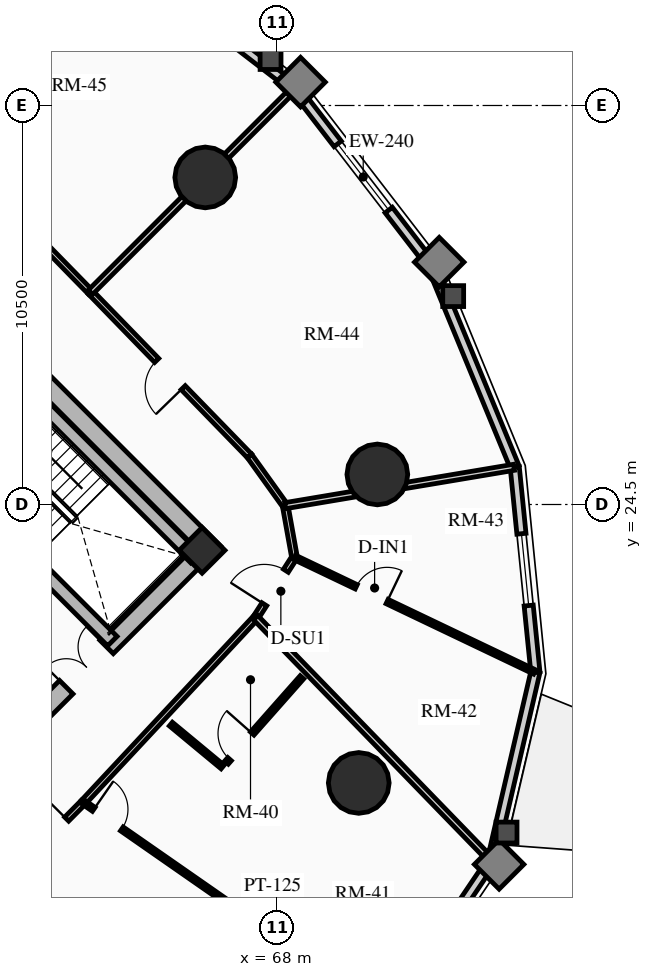
"""IFC4 building model, lengths in metres.
Left out: names, types, materials, properties, quantities, classifications, styles, units other than length and angle.
Written with IfcOpenShell. Run it as: python <this file> out.ifc"""

import sys

from ifc_helpers import new_model, si_unit, direction, frame, frame_2d, origin, origin_2d, place, context, subcontext, project, spatial, rectangle, circle, extrude, source, transform, mapped, element, fill, save


model = new_model("IFC4")
c1 = context("Model", 3, precision=1e-05, world=origin(), true_north=direction((0.0, 1.0)))
c2 = subcontext(c1, "Body", "Model", "MODEL_VIEW")
j1 = project(units=[si_unit("LENGTHUNIT", "METRE"), si_unit("PLANEANGLEUNIT", "RADIAN")], contexts=[c1])
p1 = place(None, origin())
s1 = spatial("IfcSite", under=j1, at=p1, CompositionType="ELEMENT")
p2 = place(p1, origin())
s2 = spatial("IfcBuilding", under=s1, at=p2, CompositionType="ELEMENT")
p3 = place(p2, frame((0.0, 0.0, 39.46)))
s3 = spatial("IfcBuildingStorey", under=s2, at=p3, CompositionType="ELEMENT", Elevation=39.46)
p4 = place(p3, frame((66.339, 23.227, 0.0), z_axis=(0.0, 0.0, 1.0), x_axis=(-0.707106781187, 0.707106781187, 0.0)))
e1 = element("IfcWall", 1, at=p4, inside=s3, PredefinedType="SHEAR", context=c2, shape_type="SweptSolid", body=[
    extrude(rectangle(XDim=14.3, YDim=0.5, at=frame_2d((7.15, 0.0))), origin(), (0.0, 0.0, 1.0), 2.91),
])
p5 = place(p3, frame((58.596, 15.838, 0.0), z_axis=(0.0, 0.0, 1.0), x_axis=(0.707106781187, 0.707106781187, 0.0)))
e2 = element("IfcWall", 2, at=p5, inside=s3, PredefinedType="SHEAR", context=c2, shape_type="SweptSolid", body=[
    extrude(rectangle(XDim=10.7, YDim=0.5, at=frame_2d((5.35, 0.0))), origin(), (0.0, 0.0, 1.0), 2.91),
])
m1 = source(origin(), c2, "Body", "SweptSolid", [
    extrude(rectangle(XDim=1.5, YDim=2.02, at=frame_2d((0.75, 1.01))), frame((0.0, 0.26, 0.0), z_axis=(0.0, -1.0, 0.0), x_axis=(1.0, 0.0, 0.0)), (0.0, 0.0, 1.0), 0.52),
])
p6 = place(p5, frame((5.45, 0.0, 0.0)))
e3 = element("IfcOpeningElement", 3, at=p6, cuts=e2, PredefinedType="OPENING", context=c2, shape_type="MappedRepresentation", body=[
    mapped(m1, transform((0.0, 0.0, 0.0), x_axis=(1.0, 0.0, 0.0), y_axis=(0.0, 1.0, 0.0), z_axis=(0.0, 0.0, 1.0), scale=1.0)),
])
p7 = place(p3, frame((63.662, 20.904, 0.0), z_axis=(0.0, 0.0, 1.0), x_axis=(-0.707106781187, 0.707106781187, 0.0)))
e4 = element("IfcWall", 4, at=p7, inside=s3, PredefinedType="SHEAR", context=c2, shape_type="SweptSolid", body=[
    extrude(rectangle(XDim=13.8, YDim=0.35, at=frame_2d((6.9, 0.0))), origin(), (0.0, 0.0, 1.0), 2.91),
])
m2 = source(origin(), c2, "Body", "SweptSolid", [
    extrude(rectangle(XDim=1.1, YDim=2.015, at=frame_2d((0.55, 1.007))), frame((0.0, 0.185, 0.0), z_axis=(0.0, -1.0, 0.0), x_axis=(1.0, 0.0, 0.0)), (0.0, 0.0, 1.0), 0.37),
])
p8 = place(p7, frame((10.025, 0.0, 0.0)))
e5 = element("IfcOpeningElement", 5, at=p8, cuts=e4, PredefinedType="OPENING", context=c2, shape_type="MappedRepresentation", body=[
    mapped(m2, transform((0.0, 0.0, 0.0), x_axis=(1.0, 0.0, 0.0), y_axis=(0.0, 1.0, 0.0), z_axis=(0.0, 0.0, 1.0), scale=1.0)),
])
p9 = place(p7, frame((12.025, 0.0, 0.0)))
e6 = element("IfcOpeningElement", 6, at=p9, cuts=e4, PredefinedType="OPENING", context=c2, shape_type="MappedRepresentation", body=[
    mapped(m2, transform((0.0, 0.0, 0.0), x_axis=(1.0, 0.0, 0.0), y_axis=(0.0, 1.0, 0.0), z_axis=(0.0, 0.0, 1.0), scale=1.0)),
])
m3 = source(origin(), c2, "Body", "SweptSolid", [
    extrude(rectangle(XDim=1.15, YDim=2.02, at=frame_2d((0.575, 1.01))), frame((0.0, 0.185, 0.0), z_axis=(0.0, -1.0, 0.0), x_axis=(1.0, 0.0, 0.0)), (0.0, 0.0, 1.0), 0.37),
])
p10 = place(p7, frame((5.33, 0.0, 0.0)))
e7 = element("IfcOpeningElement", 7, at=p10, cuts=e4, PredefinedType="OPENING", context=c2, shape_type="MappedRepresentation", body=[
    mapped(m3, transform((0.0, 0.0, 0.0), x_axis=(1.0, 0.0, 0.0), y_axis=(0.0, 1.0, 0.0), z_axis=(0.0, 0.0, 1.0), scale=1.0)),
])
p11 = place(p3, frame((65.847, 23.089, 0.0), z_axis=(0.0, 0.0, 1.0), x_axis=(-0.707106781187, 0.707106781187, 0.0)))
e8 = element("IfcWall", 8, at=p11, inside=s3, PredefinedType="SHEAR", context=c2, shape_type="SweptSolid", body=[
    extrude(rectangle(XDim=6.745, YDim=0.35, at=frame_2d((3.373, 0.0))), origin(), (0.0, 0.0, 1.0), 2.91),
])
p12 = place(p3, frame((66.024, 23.294, 0.0), z_axis=(0.0, 0.0, 1.0), x_axis=(0.707106781187, 0.707106781187, 0.0)))
e9 = element("IfcColumn", 9, at=p12, inside=s3, PredefinedType="COLUMN", context=c2, shape_type="SweptSolid", body=[
    extrude(rectangle(XDim=0.85, YDim=0.85, at=origin_2d()), origin(), (0.0, 0.0, 1.0), 2.91),
])
for number, where, z_axis, x_axis in (
    (10, (66.107, 33.107, 0.0), (0.0, 0.0, 1.0), (1.0, 0.0, 0.0)),
    (11, (70.146, 17.173, 0.0), (0.0, 0.0, 1.0), (1.0, 0.0, 0.0)),
    (12, (70.635, 25.291, 0.0), (0.0, 0.0, 1.0), (1.0, 0.0, 0.0)),
):
    element("IfcColumn", number, at=place(p3, frame(where, z_axis=z_axis, x_axis=x_axis)), inside=s3, PredefinedType="USERDEFINED", context=c2, shape_type="SweptSolid", body=[
        extrude(circle(Radius=0.8, at=origin_2d()), origin(), (0.0, 0.0, 1.0), 2.91),
    ])
p13 = place(p3, frame((63.778, 39.068, 0.0), z_axis=(0.0, 0.0, 1.0), x_axis=(0.792020182601, -0.610494906082, 0.0)))
e13 = element("IfcWall", 13, at=p13, inside=s3, PredefinedType="SOLIDWALL", context=c2, shape_type="SweptSolid", body=[
    extrude(rectangle(XDim=5.911, YDim=0.24, at=frame_2d((2.956, 0.0))), origin(), (0.0, 0.0, 1.0), 2.073),
])
p14 = place(p3, frame((73.644, 15.129, 0.0), z_axis=(0.0, 0.0, 1.0), x_axis=(-0.559621532896, -0.828748297084, 0.0)))
e14 = element("IfcWall", 14, at=p14, inside=s3, PredefinedType="SOLIDWALL", context=c2, shape_type="SweptSolid", body=[
    extrude(rectangle(XDim=4.879, YDim=0.24, at=frame_2d((2.439, 0.0))), origin(), (0.0, 0.0, 1.0), 2.073),
])
m4 = source(origin(), c2, "Body", "SweptSolid", [
    extrude(rectangle(XDim=1.9, YDim=1.35, at=frame_2d((0.95, 0.675))), frame((0.0, 0.13, 0.0), z_axis=(0.0, -1.0, 0.0), x_axis=(1.0, 0.0, 0.0)), (0.0, 0.0, 1.0), 0.26),
])
p15 = place(p14, frame((1.489, 0.0, 0.65)))
e15 = element("IfcOpeningElement", 15, at=p15, cuts=e14, PredefinedType="OPENING", context=c2, shape_type="MappedRepresentation", body=[
    mapped(m4, transform((0.0, 0.0, 0.0), x_axis=(1.0, 0.0, 0.0), y_axis=(0.0, 1.0, 0.0), z_axis=(0.0, 0.0, 1.0), scale=1.0)),
])
p16 = place(p3, frame((74.794, 20.09, 0.0), z_axis=(0.0, 0.0, 1.0), x_axis=(-0.22582585901, -0.974167686491, 0.0)))
e16 = element("IfcWall", 16, at=p16, inside=s3, PredefinedType="SOLIDWALL", context=c2, shape_type="SweptSolid", body=[
    extrude(rectangle(XDim=5.092, YDim=0.24, at=frame_2d((2.546, 0.0))), origin(), (0.0, 0.0, 1.0), 2.073),
])
p17 = place(p3, frame((74.251, 25.482, 0.0), z_axis=(0.0, 0.0, 1.0), x_axis=(0.100190592135, -0.994968263437, 0.0)))
e17 = element("IfcWall", 17, at=p17, inside=s3, PredefinedType="SOLIDWALL", context=c2, shape_type="SweptSolid", body=[
    extrude(rectangle(XDim=5.419, YDim=0.24, at=frame_2d((2.71, 0.0))), origin(), (0.0, 0.0, 1.0), 2.073),
])
p18 = place(p17, frame((1.76, 0.0, 0.65)))
e18 = element("IfcOpeningElement", 18, at=p18, cuts=e17, PredefinedType="OPENING", context=c2, shape_type="MappedRepresentation", body=[
    mapped(m4, transform((0.0, 0.0, 0.0), x_axis=(1.0, 0.0, 0.0), y_axis=(0.0, 1.0, 0.0), z_axis=(0.0, 0.0, 1.0), scale=1.0)),
])
p19 = place(p3, frame((72.068, 30.778, 0.0), z_axis=(0.0, 0.0, 1.0), x_axis=(0.381077764176, -0.924542988536, 0.0)))
e19 = element("IfcWall", 19, at=p19, inside=s3, PredefinedType="SOLIDWALL", context=c2, shape_type="SweptSolid", body=[
    extrude(rectangle(XDim=5.728, YDim=0.24, at=frame_2d((2.864, 0.0))), origin(), (0.0, 0.0, 1.0), 2.073),
])
p20 = place(p3, frame((68.459, 35.459, 0.0), z_axis=(0.0, 0.0, 1.0), x_axis=(0.610494906082, -0.792020182601, 0.0)))
e20 = element("IfcWall", 20, at=p20, inside=s3, PredefinedType="SOLIDWALL", context=c2, shape_type="SweptSolid", body=[
    extrude(rectangle(XDim=5.911, YDim=0.24, at=frame_2d((2.956, 0.0))), origin(), (0.0, 0.0, 1.0), 2.073),
])
m5 = source(origin(), c2, "Body", "SweptSolid", [
    extrude(rectangle(XDim=2.2, YDim=1.35, at=frame_2d((1.1, 0.675))), frame((0.0, 0.13, 0.0), z_axis=(0.0, -1.0, 0.0), x_axis=(1.0, 0.0, 0.0)), (0.0, 0.0, 1.0), 0.26),
])
p21 = place(p20, frame((1.855, 0.0, 0.65)))
e21 = element("IfcOpeningElement", 21, at=p21, cuts=e20, PredefinedType="OPENING", context=c2, shape_type="MappedRepresentation", body=[
    mapped(m5, transform((0.0, 0.0, 0.0), x_axis=(1.0, 0.0, 0.0), y_axis=(0.0, 1.0, 0.0), z_axis=(0.0, 0.0, 1.0), scale=1.0)),
])
p22 = place(p3, frame((63.086, 30.086, 0.0), z_axis=(0.0, 0.0, 1.0), x_axis=(-0.699075897379, 0.715047473741, 0.0)))
e22 = element("IfcWall", 22, at=p22, inside=s3, PredefinedType="PARTITIONING", context=c2, shape_type="SweptSolid", body=[
    extrude(rectangle(XDim=6.114, YDim=0.15, at=frame_2d((3.057, 0.0))), origin(), (0.0, 0.0, 1.0), 2.159),
])
p23 = place(p3, frame((60.562, 14.31, 0.0), z_axis=(0.0, 0.0, 1.0), x_axis=(0.704566236161, 0.709638230975, 0.0)))
e23 = element("IfcWall", 23, at=p23, inside=s3, PredefinedType="PARTITIONING", context=c2, shape_type="SweptSolid", body=[
    extrude(rectangle(XDim=3.321, YDim=0.15, at=frame_2d((1.661, 0.0))), origin(), (0.0, 0.0, 1.0), 2.159),
])
m6 = source(origin(), c2, "Body", "SweptSolid", [
    extrude(rectangle(XDim=1.05, YDim=2.015, at=frame_2d((0.525, 1.007))), frame((0.0, 0.085, 0.0), z_axis=(0.0, -1.0, 0.0), x_axis=(1.0, 0.0, 0.0)), (0.0, 0.0, 1.0), 0.17),
])
p24 = place(p23, frame((1.643, 0.0, 0.0)))
e24 = element("IfcOpeningElement", 24, at=p24, cuts=e23, PredefinedType="OPENING", context=c2, shape_type="MappedRepresentation", body=[
    mapped(m6, transform((0.0, 0.0, 0.0), x_axis=(1.0, 0.0, 0.0), y_axis=(0.0, 1.0, 0.0), z_axis=(0.0, 0.0, 1.0), scale=1.0)),
])
p25 = place(p3, frame((62.903, 16.667, 0.0), z_axis=(0.0, 0.0, 1.0), x_axis=(0.682371947497, 0.731005147225, 0.0)))
e25 = element("IfcWall", 25, at=p25, inside=s3, PredefinedType="PARTITIONING", context=c2, shape_type="SweptSolid", body=[
    extrude(rectangle(XDim=6.642, YDim=0.15, at=frame_2d((3.321, 0.0))), origin(), (0.0, 0.0, 1.0), 2.159),
])
p26 = place(p3, frame((67.435, 21.521, 0.0), z_axis=(0.0, 0.0, 1.0), x_axis=(0.540777197838, 0.841165870859, 0.0)))
e26 = element("IfcWall", 26, at=p26, inside=s3, PredefinedType="PARTITIONING", context=c2, shape_type="SweptSolid", body=[
    extrude(rectangle(XDim=1.888, YDim=0.15, at=frame_2d((0.944, 0.0))), origin(), (0.0, 0.0, 1.0), 2.205),
])
p27 = place(p26, frame((0.419, 0.0, 0.0)))
e27 = element("IfcOpeningElement", 27, at=p27, cuts=e26, PredefinedType="OPENING", context=c2, shape_type="MappedRepresentation", body=[
    mapped(m6, transform((0.0, 0.0, 0.0), x_axis=(1.0, 0.0, 0.0), y_axis=(0.0, 1.0, 0.0), z_axis=(0.0, 0.0, 1.0), scale=1.0)),
])
p28 = place(p3, frame((68.456, 23.11, 0.0), z_axis=(0.0, 0.0, 1.0), x_axis=(-0.1772522795, 0.984165448191, 0.0)))
e28 = element("IfcWall", 28, at=p28, inside=s3, PredefinedType="PARTITIONING", context=c2, shape_type="SweptSolid", body=[
    extrude(rectangle(XDim=1.382, YDim=0.15, at=frame_2d((0.691, 0.0))), origin(), (0.0, 0.0, 1.0), 2.159),
])
p29 = place(p3, frame((68.211, 24.469, 0.0), z_axis=(0.0, 0.0, 1.0), x_axis=(-0.583012141368, 0.812463441034, 0.0)))
e29 = element("IfcWall", 29, at=p29, inside=s3, PredefinedType="PARTITIONING", context=c2, shape_type="SweptSolid", body=[
    extrude(rectangle(XDim=1.613, YDim=0.15, at=frame_2d((0.807, 0.0))), origin(), (0.0, 0.0, 1.0), 2.205),
])
p30 = place(p3, frame((67.27, 25.78, 0.0), z_axis=(0.0, 0.0, 1.0), x_axis=(-0.696847842907, 0.717218992942, 0.0)))
e30 = element("IfcWall", 30, at=p30, inside=s3, PredefinedType="PARTITIONING", context=c2, shape_type="SweptSolid", body=[
    extrude(rectangle(XDim=6.004, YDim=0.15, at=frame_2d((3.002, 0.0))), origin(), (0.0, 0.0, 1.0), 2.635),
])
m7 = source(origin(), c2, "Body", "SweptSolid", [
    extrude(rectangle(XDim=1.0, YDim=2.015, at=frame_2d((0.5, 1.007))), frame((0.0, 0.085, 0.0), z_axis=(0.0, -1.0, 0.0), x_axis=(1.0, 0.0, 0.0)), (0.0, 0.0, 1.0), 0.17),
])
p31 = place(p30, frame((2.502, 0.0, 0.0)))
e31 = element("IfcOpeningElement", 31, at=p31, cuts=e30, PredefinedType="OPENING", context=c2, shape_type="MappedRepresentation", body=[
    mapped(m7, transform((0.0, 0.0, 0.0), x_axis=(1.0, 0.0, 0.0), y_axis=(0.0, 1.0, 0.0), z_axis=(0.0, 0.0, 1.0), scale=1.0)),
])
p32 = place(p3, frame((63.086, 30.086, 0.0), z_axis=(0.0, 0.0, 1.0), x_axis=(0.707106781187, 0.707106781187, 0.0)))
e32 = element("IfcWall", 32, at=p32, inside=s3, PredefinedType="PARTITIONING", context=c2, shape_type="SweptSolid", body=[
    extrude(rectangle(XDim=7.579, YDim=0.16, at=frame_2d((3.79, 0.0))), origin(), (0.0, 0.0, 1.0), 2.073),
])
p33 = place(p3, frame((60.562, 14.31, 0.0), z_axis=(0.0, 0.0, 1.0), x_axis=(0.727781661561, -0.685808904211, 0.0)))
e33 = element("IfcWall", 33, at=p33, inside=s3, PredefinedType="PARTITIONING", context=c2, shape_type="SweptSolid", body=[
    extrude(rectangle(XDim=8.655, YDim=0.16, at=frame_2d((4.328, 0.0))), origin(), (0.0, 0.0, 1.0), 2.073),
])
p34 = place(p3, frame((67.435, 21.521, 0.0), z_axis=(0.0, 0.0, 1.0), x_axis=(0.6962628802, -0.717786877601, 0.0)))
e34 = element("IfcWall", 34, at=p34, inside=s3, PredefinedType="PARTITIONING", context=c2, shape_type="SweptSolid", body=[
    extrude(rectangle(XDim=8.893, YDim=0.16, at=frame_2d((4.446, 0.0))), origin(), (0.0, 0.0, 1.0), 2.073),
])
p35 = place(p3, frame((68.211, 24.469, 0.0), z_axis=(0.0, 0.0, 1.0), x_axis=(0.986231309699, 0.165371713934, 0.0)))
e35 = element("IfcWall", 35, at=p35, inside=s3, PredefinedType="PARTITIONING", context=c2, shape_type="SweptSolid", body=[
    extrude(rectangle(XDim=6.104, YDim=0.16, at=frame_2d((3.052, 0.0))), origin(), (0.0, 0.0, 1.0), 2.073),
])
p36 = place(p3, frame((62.903, 16.667, 0.0), z_axis=(0.0, 0.0, 1.0), x_axis=(0.820761665638, -0.571270766116, 0.0)))
e36 = element("IfcWall", 36, at=p36, inside=s3, PredefinedType="PARTITIONING", context=c2, shape_type="SweptSolid", body=[
    extrude(rectangle(XDim=9.743, YDim=0.125, at=frame_2d((4.872, 0.0))), origin(), (0.0, 0.0, 1.0), 2.073),
])
m8 = source(origin(), c2, "Body", "SweptSolid", [
    extrude(rectangle(XDim=0.9, YDim=2.005, at=frame_2d((0.45, 1.002))), frame((0.0, 0.073, 0.0), z_axis=(0.0, -1.0, 0.0), x_axis=(1.0, 0.0, 0.0)), (0.0, 0.0, 1.0), 0.145),
])
p37 = place(p36, frame((0.33, 0.0, 0.0)))
e37 = element("IfcOpeningElement", 37, at=p37, cuts=e36, PredefinedType="OPENING", context=c2, shape_type="MappedRepresentation", body=[
    mapped(m8, transform((0.0, 0.0, 0.0), x_axis=(1.0, 0.0, 0.0), y_axis=(0.0, 1.0, 0.0), z_axis=(0.0, 0.0, 1.0), scale=1.0)),
])
p38 = place(p3, frame((65.202, 18.721, 0.0), z_axis=(0.0, 0.0, 1.0), x_axis=(0.769814202386, -0.638268042287, 0.0)))
e38 = element("IfcWall", 38, at=p38, inside=s3, PredefinedType="PARTITIONING", context=c2, shape_type="SweptSolid", body=[
    extrude(rectangle(XDim=1.769, YDim=0.125, at=frame_2d((0.884, 0.0))), origin(), (0.0, 0.0, 1.0), 2.635),
])
p39 = place(p3, frame((66.667, 17.709, 0.0), z_axis=(0.0, 0.0, 1.0), x_axis=(0.662510581678, 0.749052554341, 0.0)))
e39 = element("IfcWall", 39, at=p39, inside=s3, PredefinedType="PARTITIONING", context=c2, shape_type="SweptSolid", body=[
    extrude(rectangle(XDim=2.996, YDim=0.125, at=frame_2d((1.498, 0.0))), origin(), (0.0, 0.0, 1.0), 2.159),
])
p40 = place(p39, frame((0.12, 0.0, 0.0)))
e40 = element("IfcOpeningElement", 40, at=p40, cuts=e39, PredefinedType="OPENING", context=c2, shape_type="MappedRepresentation", body=[
    mapped(m8, transform((0.0, 0.0, 0.0), x_axis=(1.0, 0.0, 0.0), y_axis=(0.0, 1.0, 0.0), z_axis=(0.0, 0.0, 1.0), scale=1.0)),
])
p41 = place(p3, frame((68.456, 23.11, 0.0), z_axis=(0.0, 0.0, 1.0), x_axis=(0.902430819297, -0.430834790125, 0.0)))
e41 = element("IfcWall", 41, at=p41, inside=s3, PredefinedType="PARTITIONING", context=c2, shape_type="SweptSolid", body=[
    extrude(rectangle(XDim=7.002, YDim=0.125, at=frame_2d((3.501, 0.0))), origin(), (0.0, 0.0, 1.0), 2.073),
])
p42 = place(p41, frame((1.8, 0.0, 0.0)))
e42 = element("IfcOpeningElement", 42, at=p42, cuts=e41, PredefinedType="OPENING", context=c2, shape_type="MappedRepresentation", body=[
    mapped(m8, transform((0.0, 0.0, 0.0), x_axis=(1.0, 0.0, 0.0), y_axis=(0.0, 1.0, 0.0), z_axis=(0.0, 0.0, 1.0), scale=1.0)),
])
m9 = source(origin(), c2, "Body", "SweptSolid", [
    extrude(rectangle(XDim=1.9, YDim=1.35, at=frame_2d((0.95, 0.675))), frame((0.0, 0.03, 0.0), z_axis=(0.0, -1.0, 0.0), x_axis=(1.0, 0.0, 0.0)), (0.0, 0.0, 1.0), 0.06),
])
p43 = place(p18, origin())
e43 = element("IfcWindow", 43, at=p43, inside=s3, PartitioningType="DOUBLE_PANEL_VERTICAL", PredefinedType="WINDOW", context=c2, shape_type="MappedRepresentation", body=[
    mapped(m9, transform((0.0, 0.0, 0.0), x_axis=(1.0, 0.0, 0.0), y_axis=(0.0, 1.0, 0.0), z_axis=(0.0, 0.0, 1.0), scale=1.0)),
])
fill(e18, e43)
m10 = source(origin(), c2, "Body", "SweptSolid", [
    extrude(rectangle(XDim=2.2, YDim=1.35, at=frame_2d((1.1, 0.675))), frame((0.0, 0.03, 0.0), z_axis=(0.0, -1.0, 0.0), x_axis=(1.0, 0.0, 0.0)), (0.0, 0.0, 1.0), 0.06),
])
p44 = place(p21, origin())
e44 = element("IfcWindow", 44, at=p44, inside=s3, PartitioningType="DOUBLE_PANEL_VERTICAL", PredefinedType="WINDOW", context=c2, shape_type="MappedRepresentation", body=[
    mapped(m10, transform((0.0, 0.0, 0.0), x_axis=(1.0, 0.0, 0.0), y_axis=(0.0, 1.0, 0.0), z_axis=(0.0, 0.0, 1.0), scale=1.0)),
])
fill(e21, e44)
m11 = source(origin(), c2, "Body", "SweptSolid", [
    extrude(rectangle(XDim=1.5, YDim=2.02, at=frame_2d((0.75, 1.01))), frame((0.0, 0.025, 0.0), z_axis=(0.0, -1.0, 0.0), x_axis=(1.0, 0.0, 0.0)), (0.0, 0.0, 1.0), 0.05),
])
p45 = place(p6, origin())
e45 = element("IfcDoor", 45, at=p45, inside=s3, OperationType="DOUBLE_DOOR_SINGLE_SWING", PredefinedType="DOOR", context=c2, shape_type="MappedRepresentation", body=[
    mapped(m11, transform((0.0, 0.0, 0.0), x_axis=(1.0, 0.0, 0.0), y_axis=(0.0, 1.0, 0.0), z_axis=(0.0, 0.0, 1.0), scale=1.0)),
])
fill(e3, e45)
m12 = source(origin(), c2, "Body", "SweptSolid", [
    extrude(rectangle(XDim=1.05, YDim=2.015, at=frame_2d((0.525, 1.007))), frame((0.0, 0.025, 0.0), z_axis=(0.0, -1.0, 0.0), x_axis=(1.0, 0.0, 0.0)), (0.0, 0.0, 1.0), 0.05),
])
p46 = place(p24, origin())
e46 = element("IfcDoor", 46, at=p46, inside=s3, OperationType="SINGLE_SWING_RIGHT", PredefinedType="DOOR", context=c2, shape_type="MappedRepresentation", body=[
    mapped(m12, transform((0.0, 0.0, 0.0), x_axis=(1.0, 0.0, 0.0), y_axis=(0.0, 1.0, 0.0), z_axis=(0.0, 0.0, 1.0), scale=1.0)),
])
fill(e24, e46)
m13 = source(origin(), c2, "Body", "SweptSolid", [
    extrude(rectangle(XDim=0.9, YDim=2.005, at=frame_2d((0.45, 1.002))), frame((0.0, 0.025, 0.0), z_axis=(0.0, -1.0, 0.0), x_axis=(1.0, 0.0, 0.0)), (0.0, 0.0, 1.0), 0.05),
])
p47 = place(p37, origin())
e47 = element("IfcDoor", 47, at=p47, inside=s3, OperationType="SINGLE_SWING_LEFT", PredefinedType="DOOR", context=c2, shape_type="MappedRepresentation", body=[
    mapped(m13, transform((0.0, 0.0, 0.0), x_axis=(1.0, 0.0, 0.0), y_axis=(0.0, 1.0, 0.0), z_axis=(0.0, 0.0, 1.0), scale=1.0)),
])
fill(e37, e47)
p48 = place(p40, origin())
e48 = element("IfcDoor", 48, at=p48, inside=s3, OperationType="SINGLE_SWING_RIGHT", PredefinedType="DOOR", context=c2, shape_type="MappedRepresentation", body=[
    mapped(m13, transform((0.0, 0.0, 0.0), x_axis=(1.0, 0.0, 0.0), y_axis=(0.0, 1.0, 0.0), z_axis=(0.0, 0.0, 1.0), scale=1.0)),
])
fill(e40, e48)
p49 = place(p27, origin())
e49 = element("IfcDoor", 49, at=p49, inside=s3, OperationType="SINGLE_SWING_LEFT", PredefinedType="DOOR", context=c2, shape_type="MappedRepresentation", body=[
    mapped(m12, transform((0.0, 0.0, 0.0), x_axis=(1.0, 0.0, 0.0), y_axis=(0.0, 1.0, 0.0), z_axis=(0.0, 0.0, 1.0), scale=1.0)),
])
fill(e27, e49)
p50 = place(p42, origin())
e50 = element("IfcDoor", 50, at=p50, inside=s3, OperationType="SINGLE_SWING_RIGHT", PredefinedType="DOOR", context=c2, shape_type="MappedRepresentation", body=[
    mapped(m13, transform((0.0, 0.0, 0.0), x_axis=(1.0, 0.0, 0.0), y_axis=(0.0, 1.0, 0.0), z_axis=(0.0, 0.0, 1.0), scale=1.0)),
])
fill(e42, e50)
m14 = source(origin(), c2, "Body", "SweptSolid", [
    extrude(rectangle(XDim=1.0, YDim=2.015, at=frame_2d((0.5, 1.007))), frame((0.0, 0.025, 0.0), z_axis=(0.0, -1.0, 0.0), x_axis=(1.0, 0.0, 0.0)), (0.0, 0.0, 1.0), 0.05),
])
p51 = place(p31, origin())
e51 = element("IfcDoor", 51, at=p51, inside=s3, OperationType="SINGLE_SWING_LEFT", PredefinedType="DOOR", context=c2, shape_type="MappedRepresentation", body=[
    mapped(m14, transform((0.0, 0.0, 0.0), x_axis=(1.0, 0.0, 0.0), y_axis=(0.0, 1.0, 0.0), z_axis=(0.0, 0.0, 1.0), scale=1.0)),
])
fill(e31, e51)
save(model, sys.argv[1])
